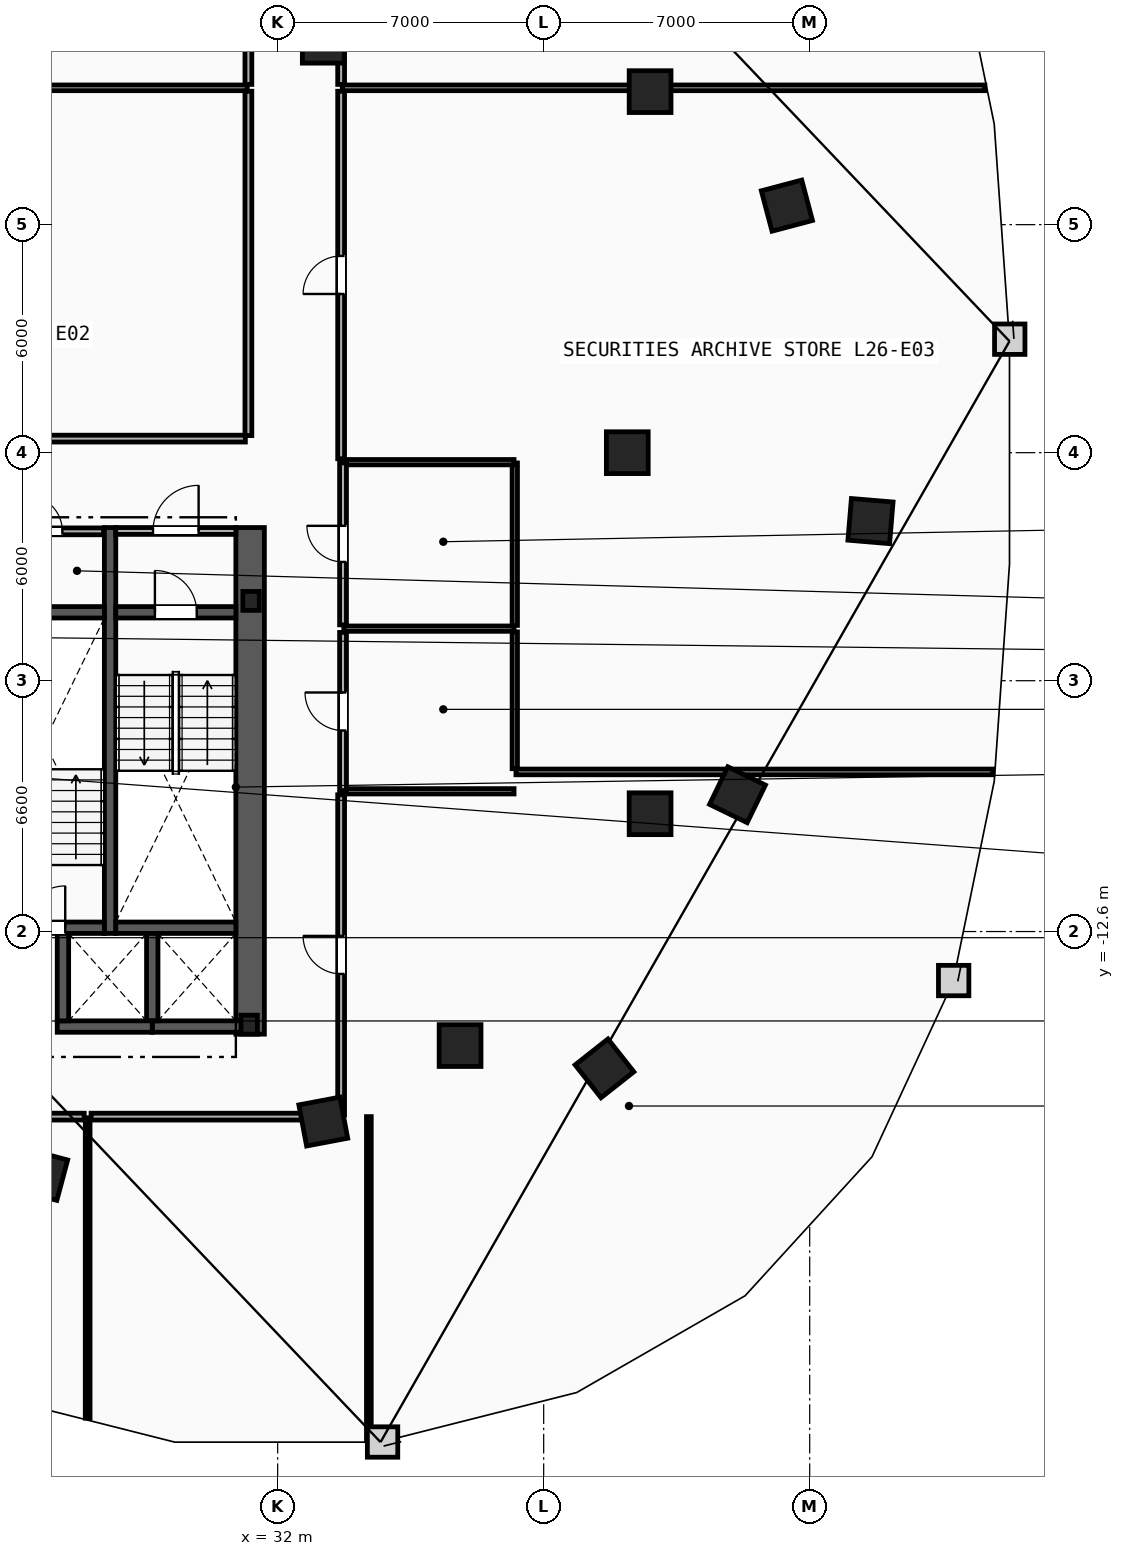
"""IFC4 building model, lengths in metres.
Left out: names, types, materials, properties, quantities, classifications, styles, units other than length and angle.
Written with IfcOpenShell. Run it as: python <this file> out.ifc"""

import sys

from ifc_helpers import new_model, si_unit, direction, frame, frame_2d, origin, origin_2d, place, context, subcontext, project, spatial, rectangle, i_section, extrude, element, fill, save


model = new_model("IFC4")
c1 = context("Model", 3, precision=1e-05, world=origin(), true_north=direction((0.0, 1.0)))
c2 = subcontext(c1, "Body", "Model", "MODEL_VIEW")
j1 = project(units=[si_unit("LENGTHUNIT", "METRE"), si_unit("PLANEANGLEUNIT", "RADIAN")], contexts=[c1])
p1 = place(None, origin())
s1 = spatial("IfcSite", under=j1, at=p1, CompositionType="ELEMENT")
p2 = place(p1, origin())
s2 = spatial("IfcBuilding", under=s1, at=p2, CompositionType="ELEMENT")
p3 = place(p2, frame((0.0, 0.0, 103.4)))
s3 = spatial("IfcBuildingStorey", under=s2, at=p3, CompositionType="ELEMENT", Elevation=103.4)
for number, where, z_axis, x_axis in (
    (1, (31.3, -3.9, 0.0), (0.0, 0.0, 1.0), (1.0, 0.0, 0.0)),
    (2, (31.25, -15.05, 0.0), (0.0, 0.0, 1.0), (1.0, 0.0, 0.0)),
):
    element("IfcColumn", number, at=place(p3, frame(where, z_axis=z_axis, x_axis=x_axis)), inside=s3, PredefinedType="COLUMN", context=c2, shape_type="SweptSolid", body=[
        extrude(i_section(OverallWidth=0.432, OverallDepth=0.498, WebThickness=0.056, FlangeThickness=0.089, FilletRadius=0.018, at=origin_2d()), origin(), (0.0, 0.0, 1.0), 3.6),
    ])
for number, where, z_axis, x_axis in (
    (3, (41.2, 0.0, 0.0), (0.0, 0.0, 1.0), (1.0, 0.0, 0.0)),
    (4, (41.8, -9.5, 0.0), (0.0, 0.0, 1.0), (1.0, 0.0, 0.0)),
    (5, (36.8, -15.6, 0.0), (0.0, 0.0, 1.0), (1.0, 0.0, 0.0)),
    (6, (41.8, 9.5, 0.0), (0.0, 0.0, 1.0), (1.0, 0.0, 0.0)),
    (7, (33.2, 10.8, 0.0), (0.0, 0.0, 1.0), (1.0, 0.0, 0.0)),
    (8, (25.8, -19.0, 0.0), (0.0, 0.0, 1.0), (0.966, -0.259, 0.0)),
    (9, (33.2, -17.6, 0.0), (0.0, 0.0, 1.0), (0.983, 0.186, 0.0)),
    (10, (40.6, -16.2, 0.0), (0.0, 0.0, 1.0), (0.785, 0.619, 0.0)),
    (11, (44.1, -9.0, 0.0), (0.0, 0.0, 1.0), (0.437, 0.899, 0.0)),
    (12, (47.6, -1.8, 0.0), (0.0, 0.0, 1.0), (0.084, 0.997, 0.0)),
    (13, (45.4, 6.5, 0.0), (0.0, 0.0, 1.0), (-0.256, 0.967, 0.0)),
):
    element("IfcColumn", number, at=place(p3, frame(where, z_axis=z_axis, x_axis=x_axis)), inside=s3, PredefinedType="COLUMN", context=c2, shape_type="SweptSolid", body=[
        extrude(rectangle(XDim=1.1, YDim=1.1, at=origin_2d()), origin(), (0.0, 0.0, 1.0), 3.6),
    ])
p4 = place(p3, frame((31.275, -15.3, 0.0), z_axis=(0.0, 0.0, 1.0), x_axis=(0.0, 1.0, 0.0)))
e14 = element("IfcWall", 14, at=p4, inside=s3, PredefinedType="SHEAR", context=c2, shape_type="SweptSolid", body=[
    extrude(rectangle(XDim=13.33, YDim=0.75, at=frame_2d((6.665, 0.0))), origin(), (0.0, 0.0, 1.0), 3.3),
])
p5 = place(p3, frame((27.59, -12.65, 0.0), z_axis=(0.0, 0.0, 1.0), x_axis=(0.0, 1.0, 0.0)))
e15 = element("IfcWall", 15, at=p5, inside=s3, PredefinedType="SHEAR", context=c2, shape_type="SweptSolid", body=[
    extrude(rectangle(XDim=10.68, YDim=0.3, at=frame_2d((5.34, 0.0))), origin(), (0.0, 0.0, 1.0), 3.3),
])
p6 = place(p3, frame((27.74, -4.2, 0.0), z_axis=(0.0, 0.0, 1.0), x_axis=(1.0, 0.0, 0.0)))
e16 = element("IfcWall", 16, at=p6, inside=s3, PredefinedType="SHEAR", context=c2, shape_type="SweptSolid", body=[
    extrude(rectangle(XDim=3.16, YDim=0.3, at=frame_2d((1.58, 0.0))), origin(), (0.0, 0.0, 1.0), 3.3),
])
p7 = place(p6, frame((1.03, 0.0, 0.0)))
e17 = element("IfcOpeningElement", 17, at=p7, cuts=e16, PredefinedType="OPENING", context=c2, shape_type="SweptSolid", body=[
    extrude(rectangle(XDim=1.1, YDim=2.15, at=frame_2d((0.55, 1.075))), frame((0.0, 0.16, 0.0), z_axis=(0.0, -1.0, 0.0), x_axis=(1.0, 0.0, 0.0)), (0.0, 0.0, 1.0), 0.32),
])
p8 = place(p3, frame((27.74, -12.5, 0.0), z_axis=(0.0, 0.0, 1.0), x_axis=(1.0, 0.0, 0.0)))
e18 = element("IfcWall", 18, at=p8, inside=s3, PredefinedType="SHEAR", context=c2, shape_type="SweptSolid", body=[
    extrude(rectangle(XDim=3.16, YDim=0.3, at=frame_2d((1.58, 0.0))), origin(), (0.0, 0.0, 1.0), 3.3),
])
p9 = place(p3, frame((24.28, -12.5, 0.0), z_axis=(0.0, 0.0, 1.0), x_axis=(1.0, 0.0, 0.0)))
e19 = element("IfcWall", 19, at=p9, inside=s3, PredefinedType="SHEAR", context=c2, shape_type="SweptSolid", body=[
    extrude(rectangle(XDim=3.16, YDim=0.3, at=frame_2d((1.58, 0.0))), origin(), (0.0, 0.0, 1.0), 3.3),
])
p10 = place(p9, frame((1.03, 0.0, 0.0)))
e20 = element("IfcOpeningElement", 20, at=p10, cuts=e19, PredefinedType="OPENING", context=c2, shape_type="SweptSolid", body=[
    extrude(rectangle(XDim=1.1, YDim=2.15, at=frame_2d((0.55, 1.075))), frame((0.0, 0.16, 0.0), z_axis=(0.0, -1.0, 0.0), x_axis=(1.0, 0.0, 0.0)), (0.0, 0.0, 1.0), 0.32),
])
p11 = place(p3, frame((24.28, -4.2, 0.0), z_axis=(0.0, 0.0, 1.0), x_axis=(1.0, 0.0, 0.0)))
e21 = element("IfcWall", 21, at=p11, inside=s3, PredefinedType="SHEAR", context=c2, shape_type="SweptSolid", body=[
    extrude(rectangle(XDim=3.16, YDim=0.3, at=frame_2d((1.58, 0.0))), origin(), (0.0, 0.0, 1.0), 3.3),
])
p12 = place(p3, frame((27.74, -2.06, 0.0), z_axis=(0.0, 0.0, 1.0), x_axis=(1.0, 0.0, 0.0)))
e22 = element("IfcWall", 22, at=p12, inside=s3, PredefinedType="PARTITIONING", context=c2, shape_type="SweptSolid", body=[
    extrude(rectangle(XDim=3.16, YDim=0.18, at=frame_2d((1.58, 0.0))), origin(), (0.0, 0.0, 1.0), 3.3),
])
p13 = place(p12, frame((0.98, 0.0, 0.0)))
e23 = element("IfcOpeningElement", 23, at=p13, cuts=e22, PredefinedType="OPENING", context=c2, shape_type="SweptSolid", body=[
    extrude(rectangle(XDim=1.2, YDim=2.15, at=frame_2d((0.6, 1.075))), frame((0.0, 0.1, 0.0), z_axis=(0.0, -1.0, 0.0), x_axis=(1.0, 0.0, 0.0)), (0.0, 0.0, 1.0), 0.2),
])
p14 = place(p3, frame((28.7, -15.1, 0.0), z_axis=(0.0, 0.0, 1.0), x_axis=(1.0, 0.0, 0.0)))
e24 = element("IfcWall", 24, at=p14, inside=s3, PredefinedType="SHEAR", context=c2, shape_type="SweptSolid", body=[
    extrude(rectangle(XDim=2.5, YDim=0.3, at=frame_2d((1.25, 0.0))), origin(), (0.0, 0.0, 1.0), 3.3),
])
p15 = place(p3, frame((28.7, -14.95, 0.0), z_axis=(0.0, 0.0, 1.0), x_axis=(0.0, 1.0, 0.0)))
e25 = element("IfcWall", 25, at=p15, inside=s3, PredefinedType="SHEAR", context=c2, shape_type="SweptSolid", body=[
    extrude(rectangle(XDim=2.3, YDim=0.3, at=frame_2d((1.15, 0.0))), origin(), (0.0, 0.0, 1.0), 3.3),
])
p16 = place(p3, frame((26.2, -15.1, 0.0), z_axis=(0.0, 0.0, 1.0), x_axis=(1.0, 0.0, 0.0)))
e26 = element("IfcWall", 26, at=p16, inside=s3, PredefinedType="SHEAR", context=c2, shape_type="SweptSolid", body=[
    extrude(rectangle(XDim=2.5, YDim=0.3, at=frame_2d((1.25, 0.0))), origin(), (0.0, 0.0, 1.0), 3.3),
])
p17 = place(p3, frame((26.35, -14.95, 0.0), z_axis=(0.0, 0.0, 1.0), x_axis=(0.0, 1.0, 0.0)))
e27 = element("IfcWall", 27, at=p17, inside=s3, PredefinedType="SHEAR", context=c2, shape_type="SweptSolid", body=[
    extrude(rectangle(XDim=2.3, YDim=0.3, at=frame_2d((1.15, 0.0))), origin(), (0.0, 0.0, 1.0), 3.3),
])
p18 = place(p3, frame((24.3, -2.07, 0.0), z_axis=(0.0, 0.0, 1.0), x_axis=(1.0, 0.0, 0.0)))
e28 = element("IfcWall", 28, at=p18, inside=s3, PredefinedType="PARTITIONING", context=c2, shape_type="SweptSolid", body=[
    extrude(rectangle(XDim=3.12, YDim=0.18, at=frame_2d((1.56, 0.0))), origin(), (0.0, 0.0, 1.0), 3.3),
])
p19 = place(p18, frame((1.085, 0.0, 0.0)))
e29 = element("IfcOpeningElement", 29, at=p19, cuts=e28, PredefinedType="OPENING", context=c2, shape_type="SweptSolid", body=[
    extrude(rectangle(XDim=0.95, YDim=2.1, at=frame_2d((0.475, 1.05))), frame((0.0, 0.1, 0.0), z_axis=(0.0, -1.0, 0.0), x_axis=(1.0, 0.0, 0.0)), (0.0, 0.0, 1.0), 0.2),
])
p20 = place(p3, frame((38.24, -8.315, 0.0), z_axis=(0.0, 0.0, 1.0), x_axis=(0.0, 1.0, 0.0)))
e30 = element("IfcWall", 30, at=p20, inside=s3, PredefinedType="PARTITIONING", context=c2, shape_type="SweptSolid", body=[
    extrude(rectangle(XDim=3.6, YDim=0.14, at=frame_2d((1.8, 0.0))), origin(), (0.0, 0.0, 1.0), 3.3),
])
p21 = place(p3, frame((38.24, -4.545, 0.0), z_axis=(0.0, 0.0, 1.0), x_axis=(0.0, 1.0, 0.0)))
e31 = element("IfcWall", 31, at=p21, inside=s3, PredefinedType="PARTITIONING", context=c2, shape_type="SweptSolid", body=[
    extrude(rectangle(XDim=4.275, YDim=0.14, at=frame_2d((2.137, 0.0))), origin(), (0.0, 0.0, 1.0), 3.3),
])
for number, where, z_axis, x_axis in (
    (32, (33.74, -0.25, 0.0), (0.0, 0.0, 1.0), (1.0, 0.0, 0.0)),
    (33, (33.74, -4.63, 0.0), (0.0, 0.0, 1.0), (1.0, 0.0, 0.0)),
    (34, (33.74, -8.91, 0.0), (0.0, 0.0, 1.0), (1.0, 0.0, 0.0)),
):
    element("IfcWall", number, at=place(p3, frame(where, z_axis=z_axis, x_axis=x_axis)), inside=s3, PredefinedType="PARTITIONING", context=c2, shape_type="SweptSolid", body=[
        extrude(rectangle(XDim=4.48, YDim=0.14, at=frame_2d((2.24, 0.0))), origin(), (0.0, 0.0, 1.0), 3.3),
    ])
p22 = place(p3, frame((33.72, -4.53, 0.0), z_axis=(0.0, 0.0, 1.0), x_axis=(0.0, 1.0, 0.0)))
e35 = element("IfcWall", 35, at=p22, inside=s3, PredefinedType="PARTITIONING", context=c2, shape_type="SweptSolid", body=[
    extrude(rectangle(XDim=4.26, YDim=0.18, at=frame_2d((2.13, 0.0))), origin(), (0.0, 0.0, 1.0), 3.3),
])
p23 = place(p22, frame((1.655, 0.0, 0.0)))
e36 = element("IfcOpeningElement", 36, at=p23, cuts=e35, PredefinedType="OPENING", context=c2, shape_type="SweptSolid", body=[
    extrude(rectangle(XDim=0.95, YDim=2.1, at=frame_2d((0.475, 1.05))), frame((0.0, 0.1, 0.0), z_axis=(0.0, -1.0, 0.0), x_axis=(1.0, 0.0, 0.0)), (0.0, 0.0, 1.0), 0.2),
])
p24 = place(p3, frame((33.72, -8.89, 0.0), z_axis=(0.0, 0.0, 1.0), x_axis=(0.0, 1.0, 0.0)))
e37 = element("IfcWall", 37, at=p24, inside=s3, PredefinedType="PARTITIONING", context=c2, shape_type="SweptSolid", body=[
    extrude(rectangle(XDim=4.16, YDim=0.18, at=frame_2d((2.08, 0.0))), origin(), (0.0, 0.0, 1.0), 3.3),
])
p25 = place(p24, frame((1.58, 0.0, 0.0)))
e38 = element("IfcOpeningElement", 38, at=p25, cuts=e37, PredefinedType="OPENING", context=c2, shape_type="SweptSolid", body=[
    extrude(rectangle(XDim=1.0, YDim=2.15, at=frame_2d((0.5, 1.075))), frame((0.0, 0.1, 0.0), z_axis=(0.0, -1.0, 0.0), x_axis=(1.0, 0.0, 0.0)), (0.0, 0.0, 1.0), 0.2),
])
p26 = place(p3, frame((13.39, 9.6, 0.0), z_axis=(0.0, 0.0, 1.0), x_axis=(1.0, 0.0, 0.0)))
e39 = element("IfcWall", 39, at=p26, inside=s3, PredefinedType="PARTITIONING", context=c2, shape_type="SweptSolid", body=[
    extrude(rectangle(XDim=17.81, YDim=0.15, at=frame_2d((8.905, 0.0))), origin(), (0.0, 0.0, 1.0), 2.605),
])
p27 = place(p3, frame((33.7, 9.6, 0.0), z_axis=(0.0, 0.0, 1.0), x_axis=(1.0, 0.0, 0.0)))
e40 = element("IfcWall", 40, at=p27, inside=s3, PredefinedType="PARTITIONING", context=c2, shape_type="SweptSolid", body=[
    extrude(rectangle(XDim=16.91, YDim=0.15, at=frame_2d((8.455, 0.0))), origin(), (0.0, 0.0, 1.0), 2.605),
])
p28 = place(p3, frame((38.27, -8.4, 0.0), z_axis=(0.0, 0.0, 1.0), x_axis=(1.0, 0.0, 0.0)))
e41 = element("IfcWall", 41, at=p28, inside=s3, PredefinedType="PARTITIONING", context=c2, shape_type="SweptSolid", body=[
    extrude(rectangle(XDim=12.553, YDim=0.15, at=frame_2d((6.276, 0.0))), origin(), (0.0, 0.0, 1.0), 3.3),
])
p29 = place(p3, frame((27.0, -25.404, 0.0), z_axis=(0.0, 0.0, 1.0), x_axis=(0.0, 1.0, 0.0)))
e42 = element("IfcWall", 42, at=p29, inside=s3, PredefinedType="PARTITIONING", context=c2, shape_type="SweptSolid", body=[
    extrude(rectangle(XDim=7.904, YDim=0.125, at=frame_2d((3.952, 0.0))), origin(), (0.0, 0.0, 1.0), 3.3),
])
p30 = place(p3, frame((34.4, -25.985, 0.0), z_axis=(0.0, 0.0, 1.0), x_axis=(0.0, 1.0, 0.0)))
e43 = element("IfcWall", 43, at=p30, inside=s3, PredefinedType="PARTITIONING", context=c2, shape_type="SweptSolid", body=[
    extrude(rectangle(XDim=8.515, YDim=0.125, at=frame_2d((4.258, 0.0))), origin(), (0.0, 0.0, 1.0), 3.3),
])
p31 = place(p3, frame((33.67, -17.428, 0.0), z_axis=(0.0, 0.0, 1.0), x_axis=(0.0, 1.0, 0.0)))
e44 = element("IfcWall", 44, at=p31, inside=s3, PredefinedType="PARTITIONING", context=c2, shape_type="SweptSolid", body=[
    extrude(rectangle(XDim=8.427, YDim=0.18, at=frame_2d((4.213, 0.0))), origin(), (0.0, 0.0, 1.0), 3.3),
])
p32 = place(p31, frame((3.713, 0.0, 0.0)))
e45 = element("IfcOpeningElement", 45, at=p32, cuts=e44, PredefinedType="OPENING", context=c2, shape_type="SweptSolid", body=[
    extrude(rectangle(XDim=1.0, YDim=2.15, at=frame_2d((0.5, 1.075))), frame((0.0, 0.1, 0.0), z_axis=(0.0, -1.0, 0.0), x_axis=(1.0, 0.0, 0.0)), (0.0, 0.0, 1.0), 0.2),
])
p33 = place(p3, frame((27.09, -17.47, 0.0), z_axis=(0.0, 0.0, 1.0), x_axis=(1.0, 0.0, 0.0)))
e46 = element("IfcWall", 46, at=p33, inside=s3, PredefinedType="PARTITIONING", context=c2, shape_type="SweptSolid", body=[
    extrude(rectangle(XDim=6.538, YDim=0.18, at=frame_2d((3.269, 0.0))), origin(), (0.0, 0.0, 1.0), 3.3),
])
p34 = place(p3, frame((31.15, 0.37, 0.0), z_axis=(0.0, 0.0, 1.0), x_axis=(-1.0, 0.0, 0.0)))
e47 = element("IfcWall", 47, at=p34, inside=s3, PredefinedType="PARTITIONING", context=c2, shape_type="SweptSolid", body=[
    extrude(rectangle(XDim=14.328, YDim=0.18, at=frame_2d((7.164, 0.0))), origin(), (0.0, 0.0, 1.0), 3.3),
])
p35 = place(p34, frame((6.664, 0.0, 0.0)))
e48 = element("IfcOpeningElement", 48, at=p35, cuts=e47, PredefinedType="OPENING", context=c2, shape_type="SweptSolid", body=[
    extrude(rectangle(XDim=1.0, YDim=2.15, at=frame_2d((0.5, 1.075))), frame((0.0, 0.1, 0.0), z_axis=(0.0, -1.0, 0.0), x_axis=(1.0, 0.0, 0.0)), (0.0, 0.0, 1.0), 0.2),
])
p36 = place(p3, frame((16.822, -17.47, 0.0), z_axis=(0.0, 0.0, 1.0), x_axis=(1.0, 0.0, 0.0)))
e49 = element("IfcWall", 49, at=p36, inside=s3, PredefinedType="PARTITIONING", context=c2, shape_type="SweptSolid", body=[
    extrude(rectangle(XDim=10.088, YDim=0.18, at=frame_2d((5.044, 0.0))), origin(), (0.0, 0.0, 1.0), 3.3),
])
p37 = place(p3, frame((31.23, 9.51, 0.0), z_axis=(0.0, 0.0, 1.0), x_axis=(0.0, -1.0, 0.0)))
e50 = element("IfcWall", 50, at=p37, inside=s3, PredefinedType="PARTITIONING", context=c2, shape_type="SweptSolid", body=[
    extrude(rectangle(XDim=9.06, YDim=0.18, at=frame_2d((4.53, 0.0))), origin(), (0.0, 0.0, 1.0), 3.3),
])
p38 = place(p3, frame((33.67, -0.159, 0.0), z_axis=(0.0, 0.0, 1.0), x_axis=(0.0, 1.0, 0.0)))
e51 = element("IfcWall", 51, at=p38, inside=s3, PredefinedType="PARTITIONING", context=c2, shape_type="SweptSolid", body=[
    extrude(rectangle(XDim=9.669, YDim=0.18, at=frame_2d((4.834, 0.0))), origin(), (0.0, 0.0, 1.0), 3.3),
])
p39 = place(p38, frame((4.334, 0.0, 0.0)))
e52 = element("IfcOpeningElement", 52, at=p39, cuts=e51, PredefinedType="OPENING", context=c2, shape_type="SweptSolid", body=[
    extrude(rectangle(XDim=1.0, YDim=2.15, at=frame_2d((0.5, 1.075))), frame((0.0, 0.1, 0.0), z_axis=(0.0, -1.0, 0.0), x_axis=(1.0, 0.0, 0.0)), (0.0, 0.0, 1.0), 0.2),
])
for number, where, z_axis, x_axis in (
    (53, (33.67, 9.69, 0.0), (0.0, 0.0, 1.0), (0.0, 1.0, 0.0)),
    (54, (31.23, 11.4, 0.0), (0.0, 0.0, 1.0), (0.0, -1.0, 0.0)),
):
    element("IfcWall", number, at=place(p3, frame(where, z_axis=z_axis, x_axis=x_axis)), inside=s3, PredefinedType="PARTITIONING", context=c2, shape_type="SweptSolid", body=[
        extrude(rectangle(XDim=1.71, YDim=0.18, at=frame_2d((0.855, 0.0))), origin(), (0.0, 0.0, 1.0), 3.3),
    ])
p40 = place(p7, origin())
e55 = element("IfcDoor", 55, at=p40, inside=s3, OperationType="SINGLE_SWING_LEFT", PredefinedType="DOOR", context=c2, shape_type="SweptSolid", body=[
    extrude(rectangle(XDim=1.1, YDim=2.15, at=frame_2d((0.55, 1.075))), frame((0.0, 0.025, 0.0), z_axis=(0.0, -1.0, 0.0), x_axis=(1.0, 0.0, 0.0)), (0.0, 0.0, 1.0), 0.05),
])
fill(e17, e55)
p41 = place(p10, origin())
e56 = element("IfcDoor", 56, at=p41, inside=s3, OperationType="SINGLE_SWING_RIGHT", PredefinedType="DOOR", context=c2, shape_type="SweptSolid", body=[
    extrude(rectangle(XDim=1.1, YDim=2.15, at=frame_2d((0.55, 1.075))), frame((0.0, 0.025, 0.0), z_axis=(0.0, -1.0, 0.0), x_axis=(1.0, 0.0, 0.0)), (0.0, 0.0, 1.0), 0.05),
])
fill(e20, e56)
p42 = place(p13, origin())
e57 = element("IfcDoor", 57, at=p42, inside=s3, OperationType="SINGLE_SWING_RIGHT", PredefinedType="DOOR", context=c2, shape_type="SweptSolid", body=[
    extrude(rectangle(XDim=1.2, YDim=2.15, at=frame_2d((0.6, 1.075))), frame((0.0, 0.025, 0.0), z_axis=(0.0, -1.0, 0.0), x_axis=(1.0, 0.0, 0.0)), (0.0, 0.0, 1.0), 0.05),
])
fill(e23, e57)
p43 = place(p39, origin())
e58 = element("IfcDoor", 58, at=p43, inside=s3, OperationType="SINGLE_SWING_LEFT", PredefinedType="DOOR", context=c2, shape_type="SweptSolid", body=[
    extrude(rectangle(XDim=1.0, YDim=2.15, at=frame_2d((0.5, 1.075))), frame((0.0, 0.025, 0.0), z_axis=(0.0, -1.0, 0.0), x_axis=(1.0, 0.0, 0.0)), (0.0, 0.0, 1.0), 0.05),
])
fill(e52, e58)
p44 = place(p32, origin())
e59 = element("IfcDoor", 59, at=p44, inside=s3, OperationType="SINGLE_SWING_RIGHT", PredefinedType="DOOR", context=c2, shape_type="SweptSolid", body=[
    extrude(rectangle(XDim=1.0, YDim=2.15, at=frame_2d((0.5, 1.075))), frame((0.0, 0.025, 0.0), z_axis=(0.0, -1.0, 0.0), x_axis=(1.0, 0.0, 0.0)), (0.0, 0.0, 1.0), 0.05),
])
fill(e45, e59)
p45 = place(p23, origin())
e60 = element("IfcDoor", 60, at=p45, inside=s3, OperationType="SINGLE_SWING_RIGHT", PredefinedType="DOOR", context=c2, shape_type="SweptSolid", body=[
    extrude(rectangle(XDim=0.95, YDim=2.1, at=frame_2d((0.475, 1.05))), frame((0.0, 0.025, 0.0), z_axis=(0.0, -1.0, 0.0), x_axis=(1.0, 0.0, 0.0)), (0.0, 0.0, 1.0), 0.05),
])
fill(e36, e60)
p46 = place(p25, origin())
e61 = element("IfcDoor", 61, at=p46, inside=s3, OperationType="SINGLE_SWING_RIGHT", PredefinedType="DOOR", context=c2, shape_type="SweptSolid", body=[
    extrude(rectangle(XDim=1.0, YDim=2.15, at=frame_2d((0.5, 1.075))), frame((0.0, 0.025, 0.0), z_axis=(0.0, -1.0, 0.0), x_axis=(1.0, 0.0, 0.0)), (0.0, 0.0, 1.0), 0.05),
])
fill(e38, e61)
p47 = place(p19, origin())
e62 = element("IfcDoor", 62, at=p47, inside=s3, OperationType="SINGLE_SWING_LEFT", PredefinedType="DOOR", context=c2, shape_type="SweptSolid", body=[
    extrude(rectangle(XDim=0.95, YDim=2.1, at=frame_2d((0.475, 1.05))), frame((0.0, 0.025, 0.0), z_axis=(0.0, -1.0, 0.0), x_axis=(1.0, 0.0, 0.0)), (0.0, 0.0, 1.0), 0.05),
])
fill(e29, e62)
save(model, sys.argv[1])
